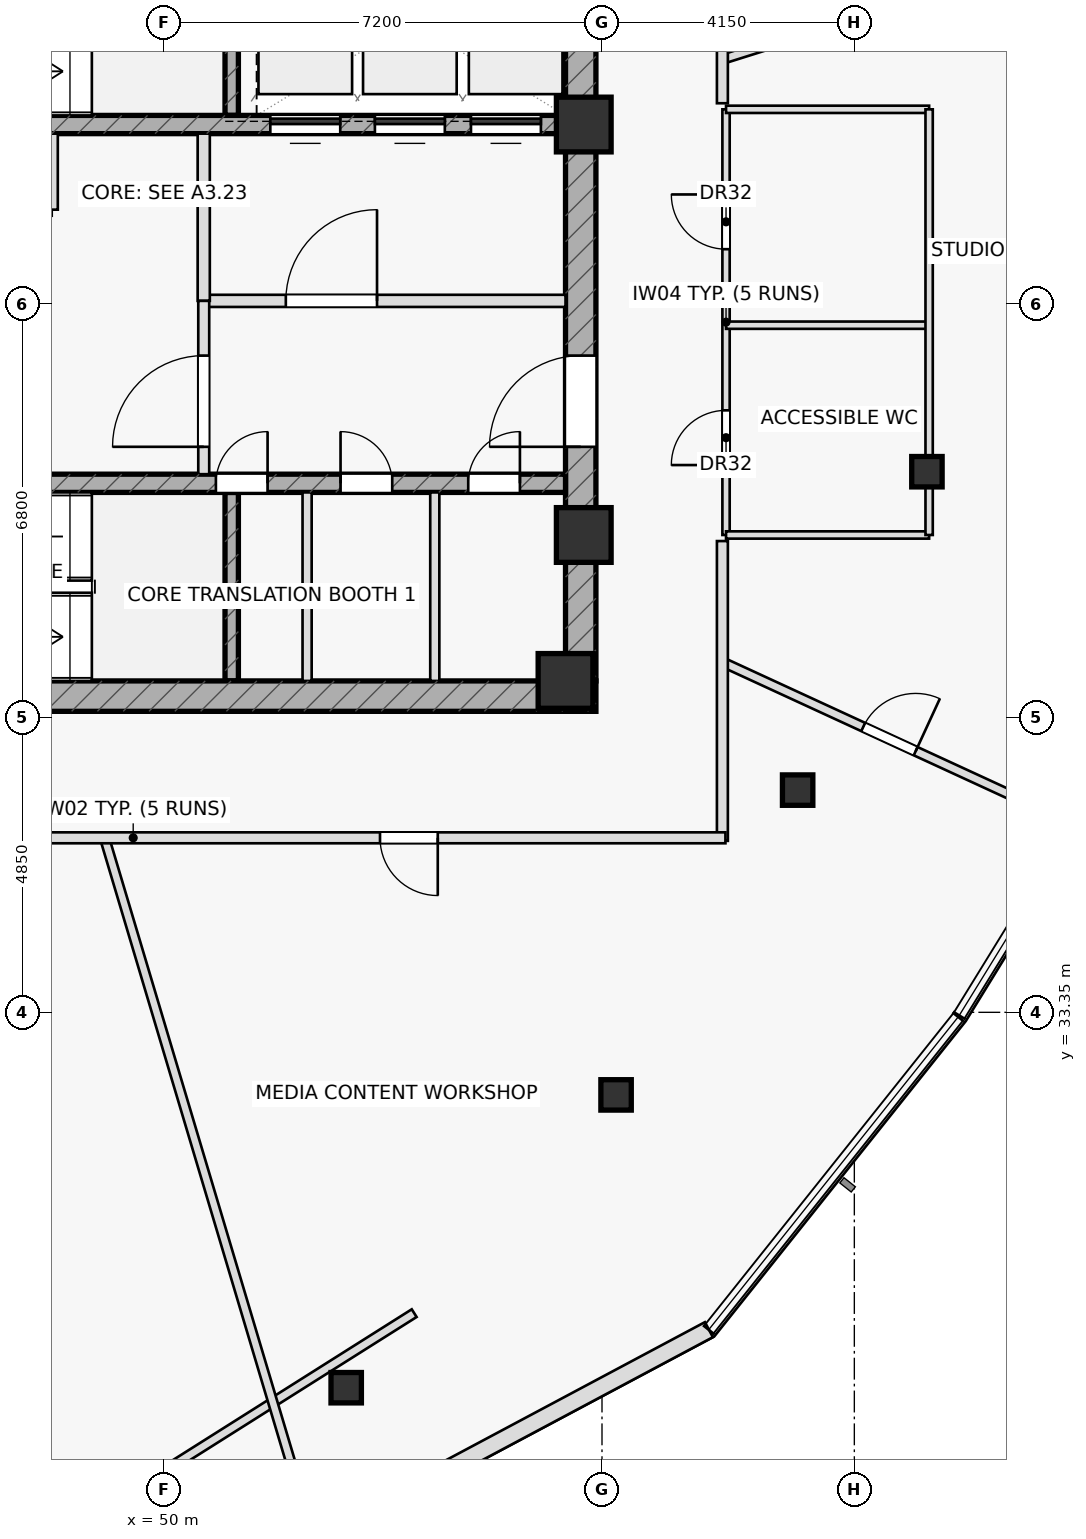
"""IFC4 building model, lengths in metres.
Left out: names, types, materials, properties, quantities, classifications, styles, units other than length and angle.
Written with IfcOpenShell. Run it as: python <this file> out.ifc"""

import sys

from ifc_helpers import new_model, si_unit, direction, frame, frame_2d, origin, origin_2d, place, context, subcontext, project, spatial, rectangle, hollow_rectangle, extrude, element, fill, save


model = new_model("IFC4")
c1 = context("Model", 3, precision=1e-05, world=origin(), true_north=direction((0.0, 1.0)))
c2 = subcontext(c1, "Body", "Model", "MODEL_VIEW")
j1 = project(units=[si_unit("LENGTHUNIT", "METRE"), si_unit("PLANEANGLEUNIT", "RADIAN")], contexts=[c1])
p1 = place(None, origin())
s1 = spatial("IfcSite", under=j1, at=p1, CompositionType="ELEMENT")
p2 = place(p1, origin())
s2 = spatial("IfcBuilding", under=s1, at=p2, CompositionType="ELEMENT")
p3 = place(p2, frame((0.0, 0.0, 273.5)))
s3 = spatial("IfcBuildingStorey", under=s2, at=p3, CompositionType="ELEMENT", Elevation=273.5)
for number, where, z_axis, x_axis in (
    (1, (51.11, 48.1, 0.0), (0.0, 0.0, 1.0), (0.0, 1.0, 0.0)),
    (2, (51.11, 38.8, 0.0), (0.0, 0.0, 1.0), (0.0, 1.0, 0.0)),
):
    element("IfcWall", number, at=place(p3, frame(where, z_axis=z_axis, x_axis=x_axis)), inside=s3, PredefinedType="SHEAR", context=c2, shape_type="SweptSolid", body=[
        extrude(rectangle(XDim=3.1, YDim=0.22, at=frame_2d((1.55, 0.0))), origin(), (0.0, 0.0, 1.0), 3.7),
    ])
p4 = place(p3, frame((42.9, 38.55, 0.0), z_axis=(0.0, 0.0, 1.0), x_axis=(1.0, 0.0, 0.0)))
e3 = element("IfcWall", 3, at=p4, inside=s3, PredefinedType="SHEAR", context=c2, shape_type="SweptSolid", body=[
    extrude(rectangle(XDim=14.2, YDim=0.5, at=frame_2d((7.1, 0.0))), origin(), (0.0, 0.0, 1.0), 3.7),
])
p5 = place(p4, frame((0.78, 0.0, 0.0)))
e4 = element("IfcOpeningElement", 4, at=p5, cuts=e3, PredefinedType="OPENING", context=c2, shape_type="SweptSolid", body=[
    extrude(rectangle(XDim=1.05, YDim=2.2, at=frame_2d((0.525, 1.1))), frame((0.0, 0.26, 0.0), z_axis=(0.0, -1.0, 0.0), x_axis=(1.0, 0.0, 0.0)), (0.0, 0.0, 1.0), 0.52),
])
p6 = place(p3, frame((56.85, 38.8, 0.0), z_axis=(0.0, 0.0, 1.0), x_axis=(0.0, 1.0, 0.0)))
e5 = element("IfcWall", 5, at=p6, inside=s3, PredefinedType="SHEAR", context=c2, shape_type="SweptSolid", body=[
    extrude(rectangle(XDim=12.4, YDim=0.5, at=frame_2d((6.2, 0.0))), origin(), (0.0, 0.0, 1.0), 3.7),
])
p7 = place(p6, frame((3.85, 0.0, 0.0)))
e6 = element("IfcOpeningElement", 6, at=p7, cuts=e5, PredefinedType="OPENING", context=c2, shape_type="SweptSolid", body=[
    extrude(rectangle(XDim=1.5, YDim=2.2, at=frame_2d((0.75, 1.1))), frame((0.0, 0.26, 0.0), z_axis=(0.0, -1.0, 0.0), x_axis=(1.0, 0.0, 0.0)), (0.0, 0.0, 1.0), 0.52),
])
p8 = place(p3, frame((43.4, 47.95, 0.0), z_axis=(0.0, 0.0, 1.0), x_axis=(1.0, 0.0, 0.0)))
e7 = element("IfcWall", 7, at=p8, inside=s3, PredefinedType="SHEAR", context=c2, shape_type="SweptSolid", body=[
    extrude(rectangle(XDim=13.2, YDim=0.3, at=frame_2d((6.6, 0.0))), origin(), (0.0, 0.0, 1.0), 3.7),
])
p9 = place(p8, frame((8.345, 0.0, 0.0)))
e8 = element("IfcOpeningElement", 8, at=p9, cuts=e7, PredefinedType="OPENING", context=c2, shape_type="SweptSolid", body=[
    extrude(rectangle(XDim=1.15, YDim=2.2, at=frame_2d((0.575, 1.1))), frame((0.0, 0.16, 0.0), z_axis=(0.0, -1.0, 0.0), x_axis=(1.0, 0.0, 0.0)), (0.0, 0.0, 1.0), 0.32),
])
p10 = place(p8, frame((10.065, 0.0, 0.0)))
e9 = element("IfcOpeningElement", 9, at=p10, cuts=e7, PredefinedType="OPENING", context=c2, shape_type="SweptSolid", body=[
    extrude(rectangle(XDim=1.15, YDim=2.2, at=frame_2d((0.575, 1.1))), frame((0.0, 0.16, 0.0), z_axis=(0.0, -1.0, 0.0), x_axis=(1.0, 0.0, 0.0)), (0.0, 0.0, 1.0), 0.32),
])
p11 = place(p8, frame((11.645, 0.0, 0.0)))
e10 = element("IfcOpeningElement", 10, at=p11, cuts=e7, PredefinedType="OPENING", context=c2, shape_type="SweptSolid", body=[
    extrude(rectangle(XDim=1.15, YDim=2.2, at=frame_2d((0.575, 1.1))), frame((0.0, 0.16, 0.0), z_axis=(0.0, -1.0, 0.0), x_axis=(1.0, 0.0, 0.0)), (0.0, 0.0, 1.0), 0.32),
])
p12 = place(p3, frame((43.4, 42.05, 0.0), z_axis=(0.0, 0.0, 1.0), x_axis=(1.0, 0.0, 0.0)))
e11 = element("IfcWall", 11, at=p12, inside=s3, PredefinedType="SHEAR", context=c2, shape_type="SweptSolid", body=[
    extrude(rectangle(XDim=13.2, YDim=0.3, at=frame_2d((6.6, 0.0))), origin(), (0.0, 0.0, 1.0), 3.7),
])
p13 = place(p12, frame((7.45, 0.0, 0.0)))
e12 = element("IfcOpeningElement", 12, at=p13, cuts=e11, PredefinedType="OPENING", context=c2, shape_type="SweptSolid", body=[
    extrude(rectangle(XDim=0.85, YDim=2.05, at=frame_2d((0.425, 1.025))), frame((0.0, 0.16, 0.0), z_axis=(0.0, -1.0, 0.0), x_axis=(1.0, 0.0, 0.0)), (0.0, 0.0, 1.0), 0.32),
])
p14 = place(p12, frame((9.5, 0.0, 0.0)))
e13 = element("IfcOpeningElement", 13, at=p14, cuts=e11, PredefinedType="OPENING", context=c2, shape_type="SweptSolid", body=[
    extrude(rectangle(XDim=0.85, YDim=2.05, at=frame_2d((0.425, 1.025))), frame((0.0, 0.16, 0.0), z_axis=(0.0, -1.0, 0.0), x_axis=(1.0, 0.0, 0.0)), (0.0, 0.0, 1.0), 0.32),
])
p15 = place(p12, frame((11.6, 0.0, 0.0)))
e14 = element("IfcOpeningElement", 14, at=p15, cuts=e11, PredefinedType="OPENING", context=c2, shape_type="SweptSolid", body=[
    extrude(rectangle(XDim=0.85, YDim=2.05, at=frame_2d((0.425, 1.025))), frame((0.0, 0.16, 0.0), z_axis=(0.0, -1.0, 0.0), x_axis=(1.0, 0.0, 0.0)), (0.0, 0.0, 1.0), 0.32),
])
for number, where, z_axis, x_axis in (
    (15, (56.9, 47.95, 0.0), (0.0, 0.0, 1.0), (1.0, 0.0, 0.0)),
    (16, (56.9, 41.2, 0.0), (0.0, 0.0, 1.0), (1.0, 0.0, 0.0)),
    (17, (56.6, 38.8, 0.0), (0.0, 0.0, 1.0), (1.0, 0.0, 0.0)),
):
    element("IfcColumn", number, at=place(p3, frame(where, z_axis=z_axis, x_axis=x_axis)), inside=s3, PredefinedType="COLUMN", context=c2, shape_type="SweptSolid", body=[
        extrude(rectangle(XDim=0.9, YDim=0.9, at=origin_2d()), origin(), (0.0, 0.0, 1.0), 3.7),
    ])
for number, where, z_axis, x_axis in (
    (18, (52.993, 27.177, 0.0), (0.0, 0.0, 1.0), (1.0, 0.0, 0.0)),
    (19, (57.431, 31.992, 0.0), (0.0, 0.0, 1.0), (1.0, 0.0, 0.0)),
    (20, (60.417, 37.004, 0.0), (0.0, 0.0, 1.0), (1.0, 0.0, 0.0)),
    (21, (62.544, 42.24, 0.0), (0.0, 0.0, 1.0), (1.0, 0.0, 0.0)),
):
    element("IfcColumn", number, at=place(p3, frame(where, z_axis=z_axis, x_axis=x_axis)), inside=s3, PredefinedType="COLUMN", context=c2, shape_type="SweptSolid", body=[
        extrude(hollow_rectangle(XDim=0.5, YDim=0.5, WallThickness=0.03, at=origin_2d()), origin(), (0.0, 0.0, 1.0), 3.7),
    ])
p16 = place(p3, frame((48.15, 46.55, 0.0), z_axis=(0.0, 0.0, 1.0), x_axis=(0.0, 1.0, 0.0)))
e22 = element("IfcWall", 22, at=p16, inside=s3, PredefinedType="PARTITIONING", context=c2, shape_type="SweptSolid", body=[
    extrude(rectangle(XDim=1.25, YDim=0.2, at=frame_2d((0.625, 0.0))), origin(), (0.0, 0.0, 1.0), 3.7),
])
p17 = place(p3, frame((50.65, 45.05, 0.0), z_axis=(0.0, 0.0, 1.0), x_axis=(1.0, 0.0, 0.0)))
e23 = element("IfcWall", 23, at=p17, inside=s3, PredefinedType="PARTITIONING", context=c2, shape_type="SweptSolid", body=[
    extrude(rectangle(XDim=5.95, YDim=0.2, at=frame_2d((2.975, 0.0))), origin(), (0.0, 0.0, 1.0), 3.7),
])
p18 = place(p17, frame((1.35, 0.0, 0.0)))
e24 = element("IfcOpeningElement", 24, at=p18, cuts=e23, PredefinedType="OPENING", context=c2, shape_type="SweptSolid", body=[
    extrude(rectangle(XDim=1.5, YDim=2.2, at=frame_2d((0.75, 1.1))), frame((0.0, 0.11, 0.0), z_axis=(0.0, -1.0, 0.0), x_axis=(1.0, 0.0, 0.0)), (0.0, 0.0, 1.0), 0.22),
])
p19 = place(p3, frame((50.65, 45.05, 0.0), z_axis=(0.0, 0.0, 1.0), x_axis=(0.0, 1.0, 0.0)))
e25 = element("IfcWall", 25, at=p19, inside=s3, PredefinedType="PARTITIONING", context=c2, shape_type="SweptSolid", body=[
    extrude(rectangle(XDim=2.75, YDim=0.2, at=frame_2d((1.375, 0.0))), origin(), (0.0, 0.0, 1.0), 3.7),
])
p20 = place(p3, frame((50.65, 42.2, 0.0), z_axis=(0.0, 0.0, 1.0), x_axis=(0.0, 1.0, 0.0)))
e26 = element("IfcWall", 26, at=p20, inside=s3, PredefinedType="PARTITIONING", context=c2, shape_type="SweptSolid", body=[
    extrude(rectangle(XDim=2.85, YDim=0.18, at=frame_2d((1.425, 0.0))), origin(), (0.0, 0.0, 1.0), 3.7),
])
p21 = place(p20, frame((0.45, 0.0, 0.0)))
e27 = element("IfcOpeningElement", 27, at=p21, cuts=e26, PredefinedType="OPENING", context=c2, shape_type="SweptSolid", body=[
    extrude(rectangle(XDim=1.5, YDim=2.2, at=frame_2d((0.75, 1.1))), frame((0.0, 0.1, 0.0), z_axis=(0.0, -1.0, 0.0), x_axis=(1.0, 0.0, 0.0)), (0.0, 0.0, 1.0), 0.2),
])
for number, where, z_axis, x_axis in (
    (28, (52.35, 38.8, 0.0), (0.0, 0.0, 1.0), (0.0, 1.0, 0.0)),
    (29, (54.45, 38.8, 0.0), (0.0, 0.0, 1.0), (0.0, 1.0, 0.0)),
):
    element("IfcWall", number, at=place(p3, frame(where, z_axis=z_axis, x_axis=x_axis)), inside=s3, PredefinedType="PARTITIONING", context=c2, shape_type="SweptSolid", body=[
        extrude(rectangle(XDim=3.1, YDim=0.15, at=frame_2d((1.55, 0.0))), origin(), (0.0, 0.0, 1.0), 3.7),
    ])
p22 = place(p3, frame((44.927, 22.605, 0.0), z_axis=(0.0, 0.0, 1.0), x_axis=(0.845624548895, 0.533778158326, 0.0)))
e30 = element("IfcWall", 30, at=p22, inside=s3, PredefinedType="PARTITIONING", context=c2, shape_type="SweptSolid", body=[
    extrude(rectangle(XDim=10.861, YDim=0.15, at=frame_2d((5.431, 0.0))), origin(), (0.0, 0.0, 1.0), 3.175),
])
p23 = place(p3, frame((59.24, 41.2, 0.0), z_axis=(0.0, 0.0, 1.0), x_axis=(0.0, 1.0, 0.0)))
e31 = element("IfcWall", 31, at=p23, inside=s3, PredefinedType="PARTITIONING", context=c2, shape_type="SweptSolid", body=[
    extrude(rectangle(XDim=7.0, YDim=0.12, at=frame_2d((3.5, 0.0))), origin(), (0.0, 0.0, 1.0), 3.7),
])
p24 = place(p23, frame((1.15, 0.0, 0.0)))
e32 = element("IfcOpeningElement", 32, at=p24, cuts=e31, PredefinedType="OPENING", context=c2, shape_type="SweptSolid", body=[
    extrude(rectangle(XDim=0.9, YDim=2.05, at=frame_2d((0.45, 1.025))), frame((0.0, 0.07, 0.0), z_axis=(0.0, -1.0, 0.0), x_axis=(1.0, 0.0, 0.0)), (0.0, 0.0, 1.0), 0.14),
])
p25 = place(p23, frame((4.7, 0.0, 0.0)))
e33 = element("IfcOpeningElement", 33, at=p25, cuts=e31, PredefinedType="OPENING", context=c2, shape_type="SweptSolid", body=[
    extrude(rectangle(XDim=0.9, YDim=2.05, at=frame_2d((0.45, 1.025))), frame((0.0, 0.07, 0.0), z_axis=(0.0, -1.0, 0.0), x_axis=(1.0, 0.0, 0.0)), (0.0, 0.0, 1.0), 0.14),
])
p26 = place(p3, frame((59.24, 41.2, 0.0), z_axis=(0.0, 0.0, 1.0), x_axis=(1.0, 0.0, 0.0)))
e34 = element("IfcWall", 34, at=p26, inside=s3, PredefinedType="PARTITIONING", context=c2, shape_type="SweptSolid", body=[
    extrude(rectangle(XDim=3.34, YDim=0.12, at=frame_2d((1.67, 0.0))), origin(), (0.0, 0.0, 1.0), 3.175),
])
for number, where, z_axis, x_axis in (
    (35, (59.24, 44.65, 0.0), (0.0, 0.0, 1.0), (1.0, 0.0, 0.0)),
    (36, (59.24, 48.2, 0.0), (0.0, 0.0, 1.0), (1.0, 0.0, 0.0)),
):
    element("IfcWall", number, at=place(p3, frame(where, z_axis=z_axis, x_axis=x_axis)), inside=s3, PredefinedType="PARTITIONING", context=c2, shape_type="SweptSolid", body=[
        extrude(rectangle(XDim=3.34, YDim=0.12, at=frame_2d((1.67, 0.0))), origin(), (0.0, 0.0, 1.0), 3.7),
    ])
p27 = place(p3, frame((62.58, 41.2, 0.0), z_axis=(0.0, 0.0, 1.0), x_axis=(0.0, 1.0, 0.0)))
e37 = element("IfcWall", 37, at=p27, inside=s3, PredefinedType="PARTITIONING", context=c2, shape_type="SweptSolid", body=[
    extrude(rectangle(XDim=7.0, YDim=0.12, at=frame_2d((3.5, 0.0))), origin(), (0.0, 0.0, 1.0), 3.235),
])
p28 = place(p3, frame((49.018, 36.22, 0.0), z_axis=(0.0, 0.0, 1.0), x_axis=(0.285746818713, -0.958305147432, 0.0)))
e38 = element("IfcWall", 38, at=p28, inside=s3, PredefinedType="PARTITIONING", context=c2, shape_type="SweptSolid", body=[
    extrude(rectangle(XDim=12.076, YDim=0.15, at=frame_2d((6.038, 0.0))), origin(), (0.0, 0.0, 1.0), 3.235),
])
p29 = place(p3, frame((59.18, 39.11, 0.0), z_axis=(0.0, 0.0, 1.0), x_axis=(0.908182970633, -0.418573400794, 0.0)))
e39 = element("IfcWall", 39, at=p29, inside=s3, PredefinedType="PARTITIONING", context=c2, shape_type="SweptSolid", body=[
    extrude(rectangle(XDim=6.42, YDim=0.15, at=frame_2d((3.21, 0.0))), origin(), (0.0, 0.0, 1.0), 3.235),
])
p30 = place(p29, frame((2.55, 0.0, 0.0)))
e40 = element("IfcOpeningElement", 40, at=p30, cuts=e39, PredefinedType="OPENING", context=c2, shape_type="SweptSolid", body=[
    extrude(rectangle(XDim=0.95, YDim=2.05, at=frame_2d((0.475, 1.025))), frame((0.0, 0.085, 0.0), z_axis=(0.0, -1.0, 0.0), x_axis=(1.0, 0.0, 0.0)), (0.0, 0.0, 1.0), 0.17),
])
p31 = place(p3, frame((59.18, 49.023, 0.0), z_axis=(0.0, 0.0, 1.0), x_axis=(0.953863772669, 0.300239742854, 0.0)))
e41 = element("IfcWall", 41, at=p31, inside=s3, PredefinedType="PARTITIONING", context=c2, shape_type="SweptSolid", body=[
    extrude(rectangle(XDim=10.878, YDim=0.15, at=frame_2d((5.439, 0.0))), origin(), (0.0, 0.0, 1.0), 3.175),
])
p32 = place(p3, frame((59.18, 53.83, 0.0), z_axis=(0.0, 0.0, 1.0), x_axis=(0.0, -1.0, 0.0)))
e42 = element("IfcWall", 42, at=p32, inside=s3, PredefinedType="PARTITIONING", context=c2, shape_type="SweptSolid", body=[
    extrude(rectangle(XDim=5.53, YDim=0.18, at=frame_2d((2.765, 0.0))), origin(), (0.0, 0.0, 1.0), 3.7),
])
p33 = place(p32, frame((2.028, 0.0, 0.0)))
e43 = element("IfcOpeningElement", 43, at=p33, cuts=e42, PredefinedType="OPENING", context=c2, shape_type="SweptSolid", body=[
    extrude(rectangle(XDim=0.95, YDim=2.05, at=frame_2d((0.475, 1.025))), frame((0.0, 0.1, 0.0), z_axis=(0.0, -1.0, 0.0), x_axis=(1.0, 0.0, 0.0)), (0.0, 0.0, 1.0), 0.2),
])
p34 = place(p3, frame((59.18, 41.1, 0.0), z_axis=(0.0, 0.0, 1.0), x_axis=(0.0, -1.0, 0.0)))
e44 = element("IfcWall", 44, at=p34, inside=s3, PredefinedType="PARTITIONING", context=c2, shape_type="SweptSolid", body=[
    extrude(rectangle(XDim=4.93, YDim=0.18, at=frame_2d((2.465, 0.0))), origin(), (0.0, 0.0, 1.0), 3.7),
])
p35 = place(p3, frame((59.23, 36.22, 0.0), z_axis=(0.0, 0.0, 1.0), x_axis=(-1.0, 0.0, 0.0)))
e45 = element("IfcWall", 45, at=p35, inside=s3, PredefinedType="PARTITIONING", context=c2, shape_type="SweptSolid", body=[
    extrude(rectangle(XDim=19.48, YDim=0.18, at=frame_2d((9.74, 0.0))), origin(), (0.0, 0.0, 1.0), 3.175),
])
p36 = place(p35, frame((4.731, 0.0, 0.0)))
e46 = element("IfcOpeningElement", 46, at=p36, cuts=e45, PredefinedType="OPENING", context=c2, shape_type="SweptSolid", body=[
    extrude(rectangle(XDim=0.95, YDim=2.05, at=frame_2d((0.475, 1.025))), frame((0.0, 0.1, 0.0), z_axis=(0.0, -1.0, 0.0), x_axis=(1.0, 0.0, 0.0)), (0.0, 0.0, 1.0), 0.2),
])
p37 = place(p35, frame((13.458, 0.0, 0.0)))
e47 = element("IfcOpeningElement", 47, at=p37, cuts=e45, PredefinedType="OPENING", context=c2, shape_type="SweptSolid", body=[
    extrude(rectangle(XDim=0.95, YDim=2.05, at=frame_2d((0.475, 1.025))), frame((0.0, 0.1, 0.0), z_axis=(0.0, -1.0, 0.0), x_axis=(1.0, 0.0, 0.0)), (0.0, 0.0, 1.0), 0.2),
])
p38 = place(p3, frame((52.506, 24.691, 0.0), z_axis=(0.0, 0.0, 1.0), x_axis=(0.882414857541, 0.470472123713, 0.0)))
e48 = element("IfcWall", 48, at=p38, inside=s3, PredefinedType="STANDARD", context=c2, shape_type="SweptSolid", body=[
    extrude(rectangle(XDim=7.312, YDim=0.28, at=frame_2d((3.656, 0.0))), origin(), (0.0, 0.0, 1.0), 3.7),
])
p39 = place(p7, origin())
e49 = element("IfcDoor", 49, at=p39, inside=s3, OperationType="SINGLE_SWING_LEFT", PredefinedType="DOOR", context=c2, shape_type="SweptSolid", body=[
    extrude(rectangle(XDim=1.5, YDim=2.2, at=frame_2d((0.75, 1.1))), frame((0.0, 0.025, 0.0), z_axis=(0.0, -1.0, 0.0), x_axis=(1.0, 0.0, 0.0)), (0.0, 0.0, 1.0), 0.05),
])
fill(e6, e49)
p40 = place(p18, origin())
e50 = element("IfcDoor", 50, at=p40, inside=s3, OperationType="SINGLE_SWING_RIGHT", PredefinedType="DOOR", context=c2, shape_type="SweptSolid", body=[
    extrude(rectangle(XDim=1.5, YDim=2.2, at=frame_2d((0.75, 1.1))), frame((0.0, 0.025, 0.0), z_axis=(0.0, -1.0, 0.0), x_axis=(1.0, 0.0, 0.0)), (0.0, 0.0, 1.0), 0.05),
])
fill(e24, e50)
p41 = place(p21, origin())
e51 = element("IfcDoor", 51, at=p41, inside=s3, OperationType="SINGLE_SWING_LEFT", PredefinedType="DOOR", context=c2, shape_type="SweptSolid", body=[
    extrude(rectangle(XDim=1.5, YDim=2.2, at=frame_2d((0.75, 1.1))), frame((0.0, 0.025, 0.0), z_axis=(0.0, -1.0, 0.0), x_axis=(1.0, 0.0, 0.0)), (0.0, 0.0, 1.0), 0.05),
])
fill(e27, e51)
p42 = place(p13, origin())
e52 = element("IfcDoor", 52, at=p42, inside=s3, OperationType="SINGLE_SWING_RIGHT", PredefinedType="DOOR", context=c2, shape_type="SweptSolid", body=[
    extrude(rectangle(XDim=0.85, YDim=2.05, at=frame_2d((0.425, 1.025))), frame((0.0, 0.025, 0.0), z_axis=(0.0, -1.0, 0.0), x_axis=(1.0, 0.0, 0.0)), (0.0, 0.0, 1.0), 0.05),
])
fill(e12, e52)
p43 = place(p14, origin())
e53 = element("IfcDoor", 53, at=p43, inside=s3, OperationType="SINGLE_SWING_LEFT", PredefinedType="DOOR", context=c2, shape_type="SweptSolid", body=[
    extrude(rectangle(XDim=0.85, YDim=2.05, at=frame_2d((0.425, 1.025))), frame((0.0, 0.025, 0.0), z_axis=(0.0, -1.0, 0.0), x_axis=(1.0, 0.0, 0.0)), (0.0, 0.0, 1.0), 0.05),
])
fill(e13, e53)
p44 = place(p15, origin())
e54 = element("IfcDoor", 54, at=p44, inside=s3, OperationType="SINGLE_SWING_RIGHT", PredefinedType="DOOR", context=c2, shape_type="SweptSolid", body=[
    extrude(rectangle(XDim=0.85, YDim=2.05, at=frame_2d((0.425, 1.025))), frame((0.0, 0.025, 0.0), z_axis=(0.0, -1.0, 0.0), x_axis=(1.0, 0.0, 0.0)), (0.0, 0.0, 1.0), 0.05),
])
fill(e14, e54)
p45 = place(p24, origin())
e55 = element("IfcDoor", 55, at=p45, inside=s3, OperationType="SINGLE_SWING_LEFT", PredefinedType="DOOR", context=c2, shape_type="SweptSolid", body=[
    extrude(rectangle(XDim=0.9, YDim=2.05, at=frame_2d((0.45, 1.025))), frame((0.0, 0.025, 0.0), z_axis=(0.0, -1.0, 0.0), x_axis=(1.0, 0.0, 0.0)), (0.0, 0.0, 1.0), 0.05),
])
fill(e32, e55)
p46 = place(p25, origin())
e56 = element("IfcDoor", 56, at=p46, inside=s3, OperationType="SINGLE_SWING_RIGHT", PredefinedType="DOOR", context=c2, shape_type="SweptSolid", body=[
    extrude(rectangle(XDim=0.9, YDim=2.05, at=frame_2d((0.45, 1.025))), frame((0.0, 0.025, 0.0), z_axis=(0.0, -1.0, 0.0), x_axis=(1.0, 0.0, 0.0)), (0.0, 0.0, 1.0), 0.05),
])
fill(e33, e56)
p47 = place(p30, origin())
e57 = element("IfcDoor", 57, at=p47, inside=s3, OperationType="SINGLE_SWING_RIGHT", PredefinedType="DOOR", context=c2, shape_type="SweptSolid", body=[
    extrude(rectangle(XDim=0.95, YDim=2.05, at=frame_2d((0.475, 1.025))), frame((0.0, 0.025, 0.0), z_axis=(0.0, -1.0, 0.0), x_axis=(1.0, 0.0, 0.0)), (0.0, 0.0, 1.0), 0.05),
])
fill(e40, e57)
p48 = place(p36, origin())
e58 = element("IfcDoor", 58, at=p48, inside=s3, OperationType="SINGLE_SWING_LEFT", PredefinedType="DOOR", context=c2, shape_type="SweptSolid", body=[
    extrude(rectangle(XDim=0.95, YDim=2.05, at=frame_2d((0.475, 1.025))), frame((0.0, 0.025, 0.0), z_axis=(0.0, -1.0, 0.0), x_axis=(1.0, 0.0, 0.0)), (0.0, 0.0, 1.0), 0.05),
])
fill(e46, e58)
p49 = place(p9, origin())
e59 = element("IfcDoor", 59, at=p49, inside=s3, OperationType="SLIDING_TO_LEFT", PredefinedType="DOOR", context=c2, shape_type="SweptSolid", body=[
    extrude(rectangle(XDim=1.15, YDim=2.2, at=frame_2d((0.575, 1.1))), frame((0.0, 0.025, 0.0), z_axis=(0.0, -1.0, 0.0), x_axis=(1.0, 0.0, 0.0)), (0.0, 0.0, 1.0), 0.05),
])
fill(e8, e59)
p50 = place(p10, origin())
e60 = element("IfcDoor", 60, at=p50, inside=s3, OperationType="SLIDING_TO_LEFT", PredefinedType="DOOR", context=c2, shape_type="SweptSolid", body=[
    extrude(rectangle(XDim=1.15, YDim=2.2, at=frame_2d((0.575, 1.1))), frame((0.0, 0.025, 0.0), z_axis=(0.0, -1.0, 0.0), x_axis=(1.0, 0.0, 0.0)), (0.0, 0.0, 1.0), 0.05),
])
fill(e9, e60)
p51 = place(p11, origin())
e61 = element("IfcDoor", 61, at=p51, inside=s3, OperationType="SLIDING_TO_LEFT", PredefinedType="DOOR", context=c2, shape_type="SweptSolid", body=[
    extrude(rectangle(XDim=1.15, YDim=2.2, at=frame_2d((0.575, 1.1))), frame((0.0, 0.025, 0.0), z_axis=(0.0, -1.0, 0.0), x_axis=(1.0, 0.0, 0.0)), (0.0, 0.0, 1.0), 0.05),
])
fill(e10, e61)
save(model, sys.argv[1])
